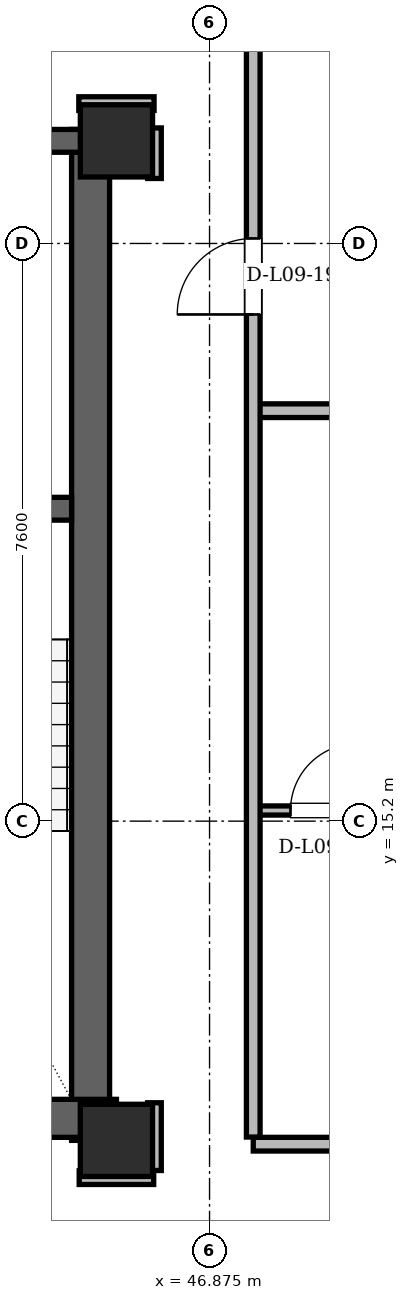
"""IFC4 building model, lengths in metres.
Left out: names, types, materials, properties, quantities, classifications, styles, units other than length and angle.
Written with IfcOpenShell. Run it as: python <this file> out.ifc"""

import sys

from ifc_helpers import new_model, si_unit, direction, frame, frame_2d, origin, origin_2d, place, context, subcontext, project, spatial, rectangle, hollow_rectangle, extrude, element, fill, save


model = new_model("IFC4")
c1 = context("Model", 3, precision=1e-05, world=origin(), true_north=direction((0.0, 1.0)))
c2 = subcontext(c1, "Body", "Model", "MODEL_VIEW")
j1 = project(units=[si_unit("LENGTHUNIT", "METRE"), si_unit("PLANEANGLEUNIT", "RADIAN")], contexts=[c1])
p1 = place(None, origin())
s1 = spatial("IfcSite", under=j1, at=p1, CompositionType="ELEMENT")
p2 = place(p1, origin())
s2 = spatial("IfcBuilding", under=s1, at=p2, CompositionType="ELEMENT")
p3 = place(p2, frame((0.0, 0.0, 38.1)))
s3 = spatial("IfcBuildingStorey", under=s2, at=p3, CompositionType="ELEMENT", Elevation=38.1)
for number, where, z_axis, x_axis in (
    (1, (45.65, 11.0, 0.0), (0.0, 0.0, 1.0), (1.0, 0.0, 0.0)),
    (2, (45.65, 24.15, 0.0), (0.0, 0.0, 1.0), (1.0, 0.0, 0.0)),
):
    element("IfcColumn", number, at=place(p3, frame(where, z_axis=z_axis, x_axis=x_axis)), inside=s3, PredefinedType="COLUMN", context=c2, shape_type="SweptSolid", body=[
        extrude(hollow_rectangle(XDim=0.95, YDim=0.95, WallThickness=0.08, at=origin_2d()), origin(), (0.0, 0.0, 1.0), 3.6),
    ])
p4 = place(p3, frame((45.31, 11.0, 0.0), z_axis=(0.0, 0.0, 1.0), x_axis=(0.0, 1.0, 0.0)))
e3 = element("IfcWall", 3, at=p4, inside=s3, PredefinedType="SHEAR", context=c2, shape_type="SweptSolid", body=[
    extrude(rectangle(XDim=13.3, YDim=0.5, at=frame_2d((6.65, 0.0))), origin(), (0.0, 0.0, 1.0), 3.36),
])
p5 = place(p3, frame((38.55, 11.29, 0.0), z_axis=(0.0, 0.0, 1.0), x_axis=(1.0, 0.0, 0.0)))
e4 = element("IfcWall", 4, at=p5, inside=s3, PredefinedType="SHEAR", context=c2, shape_type="SweptSolid", body=[
    extrude(rectangle(XDim=7.1, YDim=0.5, at=frame_2d((3.55, 0.0))), origin(), (0.0, 0.0, 1.0), 3.36),
])
p6 = place(p3, frame((29.65, 24.15, 0.0), z_axis=(0.0, 0.0, 1.0), x_axis=(1.0, 0.0, 0.0)))
e5 = element("IfcWall", 5, at=p6, inside=s3, PredefinedType="SHEAR", context=c2, shape_type="SweptSolid", body=[
    extrude(rectangle(XDim=15.7, YDim=0.3, at=frame_2d((7.85, 0.0))), origin(), (0.0, 0.0, 1.0), 3.36),
])
p7 = place(p6, frame((1.7, 0.0, 0.0)))
e6 = element("IfcOpeningElement", 6, at=p7, cuts=e5, PredefinedType="OPENING", context=c2, shape_type="SweptSolid", body=[
    extrude(rectangle(XDim=1.2, YDim=2.2, at=frame_2d((0.6, 1.1))), frame((0.0, 0.15, 0.0), z_axis=(0.0, -1.0, 0.0), x_axis=(1.0, 0.0, 0.0)), (0.0, 0.0, 1.0), 0.3),
])
p8 = place(p6, frame((12.8, 0.0, 0.0)))
e7 = element("IfcOpeningElement", 7, at=p8, cuts=e5, PredefinedType="OPENING", context=c2, shape_type="SweptSolid", body=[
    extrude(rectangle(XDim=1.2, YDim=2.2, at=frame_2d((0.6, 1.1))), frame((0.0, 0.15, 0.0), z_axis=(0.0, -1.0, 0.0), x_axis=(1.0, 0.0, 0.0)), (0.0, 0.0, 1.0), 0.3),
])
p9 = place(p6, frame((7.4, 0.0, 0.0)))
e8 = element("IfcOpeningElement", 8, at=p9, cuts=e5, PredefinedType="OPENING", context=c2, shape_type="SweptSolid", body=[
    extrude(rectangle(XDim=0.9, YDim=2.05, at=frame_2d((0.45, 1.025))), frame((0.0, 0.15, 0.0), z_axis=(0.0, -1.0, 0.0), x_axis=(1.0, 0.0, 0.0)), (0.0, 0.0, 1.0), 0.3),
])
p10 = place(p3, frame((41.05, 19.31, 0.0), z_axis=(0.0, 0.0, 1.0), x_axis=(1.0, 0.0, 0.0)))
e9 = element("IfcWall", 9, at=p10, inside=s3, PredefinedType="SHEAR", context=c2, shape_type="SweptSolid", body=[
    extrude(rectangle(XDim=4.01, YDim=0.3, at=frame_2d((2.005, 0.0))), origin(), (0.0, 0.0, 1.0), 3.36),
])
p11 = place(p10, frame((1.6, 0.0, 0.0)))
e10 = element("IfcOpeningElement", 10, at=p11, cuts=e9, PredefinedType="OPENING", context=c2, shape_type="SweptSolid", body=[
    extrude(rectangle(XDim=1.4, YDim=2.2, at=frame_2d((0.7, 1.1))), frame((0.0, 0.15, 0.0), z_axis=(0.0, -1.0, 0.0), x_axis=(1.0, 0.0, 0.0)), (0.0, 0.0, 1.0), 0.3),
])
p12 = place(p3, frame((61.713, 15.014, 0.0), z_axis=(0.0, 0.0, 1.0), x_axis=(-0.499997221217, 0.86602700811, 0.0)))
e11 = element("IfcWall", 11, at=p12, inside=s3, PredefinedType="SOLIDWALL", context=c2, shape_type="SweptSolid", body=[
    extrude(rectangle(XDim=33.022, YDim=0.34, at=frame_2d((16.511, 0.0))), origin(), (0.0, 0.0, 1.0), 2.494),
])
p13 = place(p12, frame((7.404, 0.0, 0.0)))
e12 = element("IfcOpeningElement", 12, at=p13, cuts=e11, PredefinedType="OPENING", context=c2, shape_type="SweptSolid", body=[
    extrude(rectangle(XDim=1.5, YDim=2.2, at=frame_2d((0.75, 1.1))), frame((0.0, 0.17, 0.0), z_axis=(0.0, -1.0, 0.0), x_axis=(1.0, 0.0, 0.0)), (0.0, 0.0, 1.0), 0.34),
])
p14 = place(p12, frame((25.362, 0.0, 0.0)))
e13 = element("IfcOpeningElement", 13, at=p14, cuts=e11, PredefinedType="OPENING", context=c2, shape_type="SweptSolid", body=[
    extrude(rectangle(XDim=1.5, YDim=2.2, at=frame_2d((0.75, 1.1))), frame((0.0, 0.17, 0.0), z_axis=(0.0, -1.0, 0.0), x_axis=(1.0, 0.0, 0.0)), (0.0, 0.0, 1.0), 0.34),
])
p15 = place(p12, frame((1.657, 0.0, 0.85)))
e14 = element("IfcOpeningElement", 14, at=p15, cuts=e11, PredefinedType="OPENING", context=c2, shape_type="SweptSolid", body=[
    extrude(rectangle(XDim=1.2, YDim=1.48, at=frame_2d((0.6, 0.74))), frame((0.0, 0.17, 0.0), z_axis=(0.0, -1.0, 0.0), x_axis=(1.0, 0.0, 0.0)), (0.0, 0.0, 1.0), 0.34),
])
p16 = place(p12, frame((17.282, 0.0, 0.85)))
e15 = element("IfcOpeningElement", 15, at=p16, cuts=e11, PredefinedType="OPENING", context=c2, shape_type="SweptSolid", body=[
    extrude(rectangle(XDim=2.5, YDim=1.534, at=frame_2d((1.25, 0.767))), frame((0.0, 0.17, 0.0), z_axis=(0.0, -1.0, 0.0), x_axis=(1.0, 0.0, 0.0)), (0.0, 0.0, 1.0), 0.34),
])
p17 = place(p12, frame((10.692, 0.0, 0.85)))
e16 = element("IfcOpeningElement", 16, at=p17, cuts=e11, PredefinedType="OPENING", context=c2, shape_type="SweptSolid", body=[
    extrude(rectangle(XDim=1.2, YDim=1.48, at=frame_2d((0.6, 0.74))), frame((0.0, 0.17, 0.0), z_axis=(0.0, -1.0, 0.0), x_axis=(1.0, 0.0, 0.0)), (0.0, 0.0, 1.0), 0.34),
])
p18 = place(p12, frame((13.576, 0.0, 0.85)))
e17 = element("IfcOpeningElement", 17, at=p18, cuts=e11, PredefinedType="OPENING", context=c2, shape_type="SweptSolid", body=[
    extrude(rectangle(XDim=1.2, YDim=1.48, at=frame_2d((0.6, 0.74))), frame((0.0, 0.17, 0.0), z_axis=(0.0, -1.0, 0.0), x_axis=(1.0, 0.0, 0.0)), (0.0, 0.0, 1.0), 0.34),
])
p19 = place(p3, frame((45.16, 10.51, 0.0), z_axis=(0.0, 0.0, 1.0), x_axis=(1.0, 0.0, 0.0)))
e18 = element("IfcWall", 18, at=p19, inside=s3, PredefinedType="PARTITIONING", context=c2, shape_type="SweptSolid", body=[
    extrude(rectangle(XDim=0.98, YDim=0.18, at=frame_2d((0.49, 0.0))), origin(), (0.0, 0.0, 1.0), 2.738),
])
p20 = place(p3, frame((47.45, 10.95, 0.0), z_axis=(0.0, 0.0, 1.0), x_axis=(1.0, 0.0, 0.0)))
e19 = element("IfcWall", 19, at=p20, inside=s3, PredefinedType="PARTITIONING", context=c2, shape_type="SweptSolid", body=[
    extrude(rectangle(XDim=8.35, YDim=0.18, at=frame_2d((4.175, 0.0))), origin(), (0.0, 0.0, 1.0), 3.36),
])
p21 = place(p3, frame((47.4, 15.34, 0.0), z_axis=(0.0, 0.0, 1.0), x_axis=(1.0, 0.0, 0.0)))
e20 = element("IfcWall", 20, at=p21, inside=s3, PredefinedType="PARTITIONING", context=c2, shape_type="SweptSolid", body=[
    extrude(rectangle(XDim=13.866, YDim=0.12, at=frame_2d((6.933, 0.0))), origin(), (0.0, 0.0, 1.0), 2.946),
])
p22 = place(p21, frame((0.54, 0.0, 0.0)))
e21 = element("IfcOpeningElement", 21, at=p22, cuts=e20, PredefinedType="OPENING", context=c2, shape_type="SweptSolid", body=[
    extrude(rectangle(XDim=0.88, YDim=2.08, at=frame_2d((0.44, 1.04))), frame((0.0, 0.06, 0.0), z_axis=(0.0, -1.0, 0.0), x_axis=(1.0, 0.0, 0.0)), (0.0, 0.0, 1.0), 0.12),
])
p23 = place(p21, frame((2.524, 0.0, 0.0)))
e22 = element("IfcOpeningElement", 22, at=p23, cuts=e20, PredefinedType="OPENING", context=c2, shape_type="SweptSolid", body=[
    extrude(rectangle(XDim=0.95, YDim=2.1, at=frame_2d((0.475, 1.05))), frame((0.0, 0.06, 0.0), z_axis=(0.0, -1.0, 0.0), x_axis=(1.0, 0.0, 0.0)), (0.0, 0.0, 1.0), 0.12),
])
p24 = place(p21, frame((4.923, 0.0, 0.0)))
e23 = element("IfcOpeningElement", 23, at=p24, cuts=e20, PredefinedType="OPENING", context=c2, shape_type="SweptSolid", body=[
    extrude(rectangle(XDim=0.95, YDim=2.1, at=frame_2d((0.475, 1.05))), frame((0.0, 0.06, 0.0), z_axis=(0.0, -1.0, 0.0), x_axis=(1.0, 0.0, 0.0)), (0.0, 0.0, 1.0), 0.12),
])
p25 = place(p21, frame((8.014, 0.0, 0.0)))
e24 = element("IfcOpeningElement", 24, at=p25, cuts=e20, PredefinedType="OPENING", context=c2, shape_type="SweptSolid", body=[
    extrude(rectangle(XDim=0.92, YDim=2.12, at=frame_2d((0.46, 1.06))), frame((0.0, 0.06, 0.0), z_axis=(0.0, -1.0, 0.0), x_axis=(1.0, 0.0, 0.0)), (0.0, 0.0, 1.0), 0.12),
])
p26 = place(p21, frame((11.635, 0.0, 0.0)))
e25 = element("IfcOpeningElement", 25, at=p26, cuts=e20, PredefinedType="OPENING", context=c2, shape_type="SweptSolid", body=[
    extrude(rectangle(XDim=0.92, YDim=2.12, at=frame_2d((0.46, 1.06))), frame((0.0, 0.06, 0.0), z_axis=(0.0, -1.0, 0.0), x_axis=(1.0, 0.0, 0.0)), (0.0, 0.0, 1.0), 0.12),
])
p27 = place(p3, frame((47.45, 20.6, 0.0), z_axis=(0.0, 0.0, 1.0), x_axis=(1.0, 0.0, 0.0)))
e26 = element("IfcWall", 26, at=p27, inside=s3, PredefinedType="PARTITIONING", context=c2, shape_type="SweptSolid", body=[
    extrude(rectangle(XDim=10.837, YDim=0.18, at=frame_2d((5.418, 0.0))), origin(), (0.0, 0.0, 1.0), 2.494),
])
p28 = place(p3, frame((45.155, 24.64, 0.0), z_axis=(0.0, 0.0, 1.0), x_axis=(1.0, 0.0, 0.0)))
e27 = element("IfcWall", 27, at=p28, inside=s3, PredefinedType="PARTITIONING", context=c2, shape_type="SweptSolid", body=[
    extrude(rectangle(XDim=0.99, YDim=0.18, at=frame_2d((0.495, 0.0))), origin(), (0.0, 0.0, 1.0), 2.738),
])
p29 = place(p3, frame((46.15, 10.604, 0.0), z_axis=(0.0, 0.0, 1.0), x_axis=(0.0, 1.0, 0.0)))
e28 = element("IfcWall", 28, at=p29, inside=s3, PredefinedType="PARTITIONING", context=c2, shape_type="SweptSolid", body=[
    extrude(rectangle(XDim=0.891, YDim=0.18, at=frame_2d((0.446, 0.0))), origin(), (0.0, 0.0, 1.0), 2.738),
])
p30 = place(p3, frame((46.15, 23.655, 0.0), z_axis=(0.0, 0.0, 1.0), x_axis=(0.0, 1.0, 0.0)))
e29 = element("IfcWall", 29, at=p30, inside=s3, PredefinedType="PARTITIONING", context=c2, shape_type="SweptSolid", body=[
    extrude(rectangle(XDim=0.665, YDim=0.18, at=frame_2d((0.333, 0.0))), origin(), (0.0, 0.0, 1.0), 3.36),
])
p31 = place(p3, frame((47.45, 11.044, 0.0), z_axis=(0.0, 0.0, 1.0), x_axis=(0.0, 1.0, 0.0)))
e30 = element("IfcWall", 30, at=p31, inside=s3, PredefinedType="PARTITIONING", context=c2, shape_type="SweptSolid", body=[
    extrude(rectangle(XDim=28.326, YDim=0.18, at=frame_2d((14.163, 0.0))), origin(), (0.0, 0.0, 1.0), 2.494),
])
p32 = place(p31, frame((10.822, 0.0, 0.0)))
e31 = element("IfcOpeningElement", 31, at=p32, cuts=e30, PredefinedType="OPENING", context=c2, shape_type="SweptSolid", body=[
    extrude(rectangle(XDim=1.0, YDim=2.18, at=frame_2d((0.5, 1.09))), frame((0.0, 0.09, 0.0), z_axis=(0.0, -1.0, 0.0), x_axis=(1.0, 0.0, 0.0)), (0.0, 0.0, 1.0), 0.18),
])
p33 = place(p22, origin())
e32 = element("IfcDoor", 32, at=p33, inside=s3, OperationType="SINGLE_SWING_RIGHT", PredefinedType="DOOR", context=c2, shape_type="SweptSolid", body=[
    extrude(rectangle(XDim=0.88, YDim=2.08, at=frame_2d((0.44, 1.04))), frame((0.0, 0.025, 0.0), z_axis=(0.0, -1.0, 0.0), x_axis=(1.0, 0.0, 0.0)), (0.0, 0.0, 1.0), 0.05),
])
fill(e21, e32)
p34 = place(p32, origin())
e33 = element("IfcDoor", 33, at=p34, inside=s3, OperationType="SINGLE_SWING_LEFT", PredefinedType="DOOR", context=c2, shape_type="SweptSolid", body=[
    extrude(rectangle(XDim=1.0, YDim=2.18, at=frame_2d((0.5, 1.09))), frame((0.0, 0.025, 0.0), z_axis=(0.0, -1.0, 0.0), x_axis=(1.0, 0.0, 0.0)), (0.0, 0.0, 1.0), 0.05),
])
fill(e31, e33)
save(model, sys.argv[1])
